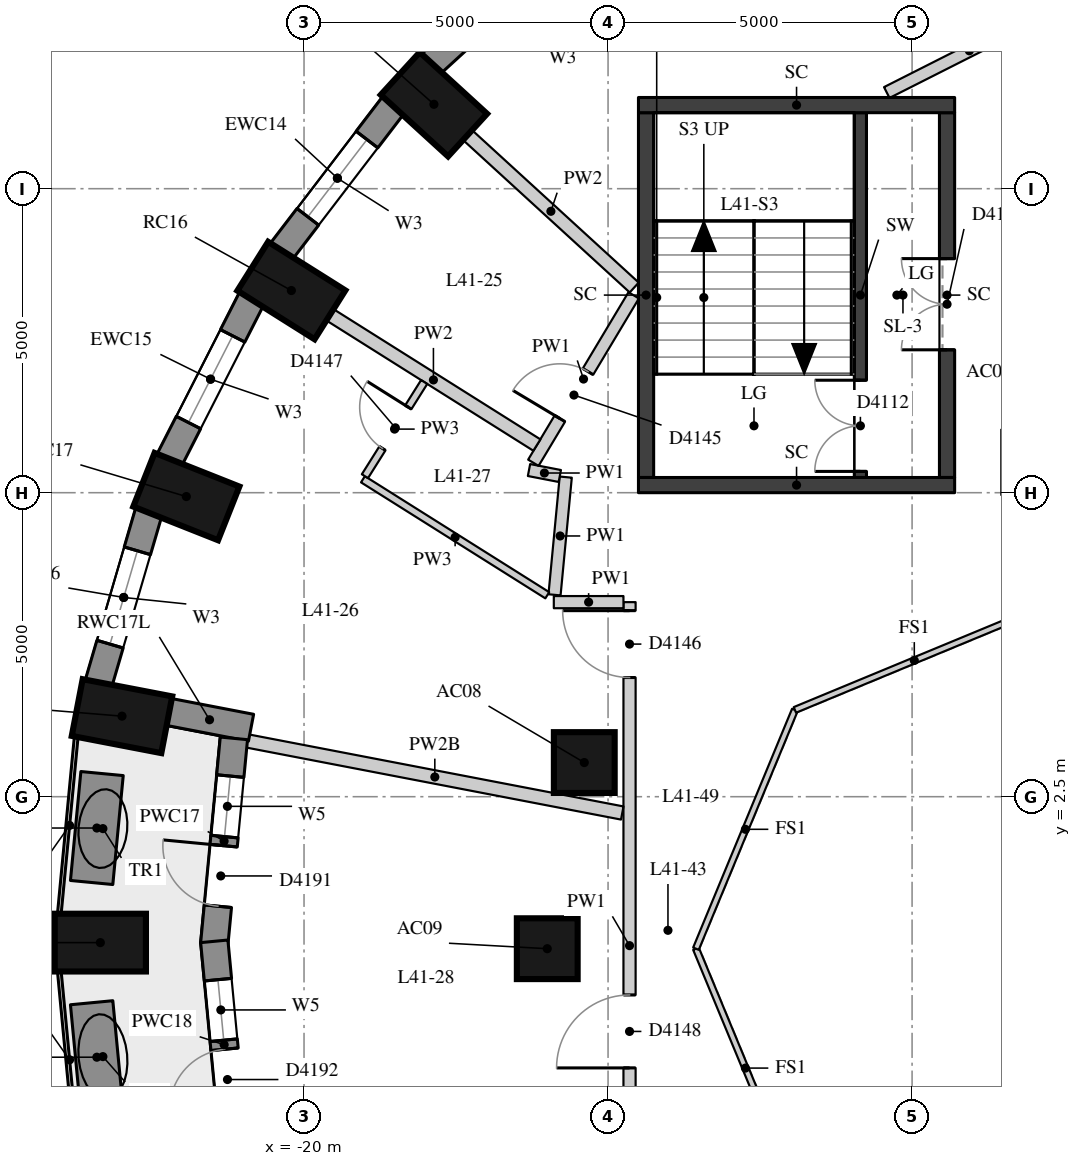
"""IFC4 building model, lengths in metres.
Left out: names, types, materials, properties, quantities, classifications, styles, units other than length and angle.
Written with IfcOpenShell. Run it as: python <this file> out.ifc"""

import sys

from ifc_helpers import new_model, si_unit, direction, frame, frame_2d, origin, origin_2d, place, context, subcontext, project, spatial, rectangle, extrude, element, fill, save


model = new_model("IFC4")
c1 = context("Model", 3, precision=1e-05, world=origin(), true_north=direction((0.0, 1.0)))
c2 = subcontext(c1, "Body", "Model", "MODEL_VIEW")
j1 = project(units=[si_unit("LENGTHUNIT", "METRE"), si_unit("PLANEANGLEUNIT", "RADIAN")], contexts=[c1])
p1 = place(None, origin())
s1 = spatial("IfcSite", under=j1, at=p1, CompositionType="ELEMENT")
p2 = place(p1, origin())
s2 = spatial("IfcBuilding", under=s1, at=p2, CompositionType="ELEMENT")
p3 = place(p2, frame((0.0, 0.0, 148.4)))
s3 = spatial("IfcBuildingStorey", under=s2, at=p3, CompositionType="ELEMENT", Elevation=148.4)
for number, where, z_axis, x_axis in (
    (1, (-17.864, 13.888, 0.0), (0.0, 0.0, 1.0), (-0.738, 0.675, 0.0)),
    (2, (-20.208, 10.825, 0.0), (0.0, 0.0, 1.0), (-0.846, 0.533, 0.0)),
    (3, (-21.936, 7.436, 0.0), (0.0, 0.0, 1.0), (-0.93, 0.369, 0.0)),
    (4, (-22.994, 3.825, 0.0), (0.0, 0.0, 1.0), (-0.982, 0.189, 0.0)),
    (5, (-23.35, 0.1, 0.0), (0.0, 0.0, 1.0), (-1.0, 0.0, 0.0)),
):
    element("IfcColumn", number, at=place(p3, frame(where, z_axis=z_axis, x_axis=x_axis)), inside=s3, PredefinedType="COLUMN", context=c2, shape_type="SweptSolid", body=[
        extrude(rectangle(XDim=1.5, YDim=0.95, at=origin_2d()), origin(), (0.0, 0.0, 1.0), 3.3),
    ])
for number, where, z_axis, x_axis in (
    (6, (-15.391, 3.062, 0.0), (0.0, 0.0, 1.0), (1.0, 0.0, 0.0)),
    (7, (-16.0, 0.0, 0.0), (0.0, 0.0, 1.0), (1.0, 0.0, 0.0)),
):
    element("IfcColumn", number, at=place(p3, frame(where, z_axis=z_axis, x_axis=x_axis)), inside=s3, PredefinedType="COLUMN", context=c2, shape_type="SweptSolid", body=[
        extrude(rectangle(XDim=1.0, YDim=1.0, at=origin_2d()), origin(), (0.0, 0.0, 1.0), 3.3),
    ])
p4 = place(p3, frame((-15.63, 16.639, 0.0), z_axis=(0.0, 0.0, 1.0), x_axis=(-0.737808755941, -0.675009807082, 0.0)))
e8 = element("IfcWall", 8, at=p4, inside=s3, PredefinedType="SOLIDWALL", context=c2, shape_type="SweptSolid", body=[
    extrude(rectangle(XDim=3.094, YDim=0.45, at=frame_2d((1.547, 0.0))), origin(), (0.0, 0.0, 1.0), 3.02),
])
p5 = place(p4, frame((0.747, 0.0, 0.4)))
e9 = element("IfcOpeningElement", 9, at=p5, cuts=e8, PredefinedType="OPENING", context=c2, shape_type="SweptSolid", body=[
    extrude(rectangle(XDim=1.6, YDim=1.75, at=frame_2d((0.8, 0.875))), frame((0.0, 0.235, 0.0), z_axis=(0.0, -1.0, 0.0), x_axis=(1.0, 0.0, 0.0)), (0.0, 0.0, 1.0), 0.47),
])
p6 = place(p3, frame((-18.528, 13.879, 0.0), z_axis=(0.0, 0.0, 1.0), x_axis=(-0.607817056371, -0.794077090706, 0.0)))
e10 = element("IfcWall", 10, at=p6, inside=s3, PredefinedType="SOLIDWALL", context=c2, shape_type="SweptSolid", body=[
    extrude(rectangle(XDim=3.037, YDim=0.45, at=frame_2d((1.519, 0.0))), origin(), (0.0, 0.0, 1.0), 3.02),
])
p7 = place(p6, frame((0.719, 0.0, 0.4)))
e11 = element("IfcOpeningElement", 11, at=p7, cuts=e10, PredefinedType="OPENING", context=c2, shape_type="SweptSolid", body=[
    extrude(rectangle(XDim=1.6, YDim=1.75, at=frame_2d((0.8, 0.875))), frame((0.0, 0.235, 0.0), z_axis=(0.0, -1.0, 0.0), x_axis=(1.0, 0.0, 0.0)), (0.0, 0.0, 1.0), 0.47),
])
p8 = place(p3, frame((-20.859, 10.697, 0.0), z_axis=(0.0, 0.0, 1.0), x_axis=(-0.454133999889, -0.890933392653, 0.0)))
e12 = element("IfcWall", 12, at=p8, inside=s3, PredefinedType="SOLIDWALL", context=c2, shape_type="SweptSolid", body=[
    extrude(rectangle(XDim=2.986, YDim=0.45, at=frame_2d((1.493, 0.0))), origin(), (0.0, 0.0, 1.0), 3.02),
])
p9 = place(p8, frame((0.693, 0.0, 0.4)))
e13 = element("IfcOpeningElement", 13, at=p9, cuts=e12, PredefinedType="OPENING", context=c2, shape_type="SweptSolid", body=[
    extrude(rectangle(XDim=1.6, YDim=1.75, at=frame_2d((0.8, 0.875))), frame((0.0, 0.235, 0.0), z_axis=(0.0, -1.0, 0.0), x_axis=(1.0, 0.0, 0.0)), (0.0, 0.0, 1.0), 0.47),
])
p10 = place(p3, frame((-22.551, 7.191, 0.0), z_axis=(0.0, 0.0, 1.0), x_axis=(-0.281125768296, -0.959670934435, 0.0)))
e14 = element("IfcWall", 14, at=p10, inside=s3, PredefinedType="SOLIDWALL", context=c2, shape_type="SweptSolid", body=[
    extrude(rectangle(XDim=2.948, YDim=0.45, at=frame_2d((1.474, 0.0))), origin(), (0.0, 0.0, 1.0), 3.02),
])
p11 = place(p10, frame((0.674, 0.0, 0.4)))
e15 = element("IfcOpeningElement", 15, at=p11, cuts=e14, PredefinedType="OPENING", context=c2, shape_type="SweptSolid", body=[
    extrude(rectangle(XDim=1.6, YDim=1.75, at=frame_2d((0.8, 0.875))), frame((0.0, 0.235, 0.0), z_axis=(0.0, -1.0, 0.0), x_axis=(1.0, 0.0, 0.0)), (0.0, 0.0, 1.0), 0.47),
])
p12 = place(p3, frame((-22.237, 3.896, 0.0), z_axis=(0.0, 0.0, 1.0), x_axis=(0.98204526411, -0.188645432598, 0.0)))
e16 = element("IfcWall", 16, at=p12, inside=s3, PredefinedType="SOLIDWALL", context=c2, shape_type="SweptSolid", body=[
    extrude(rectangle(XDim=1.39, YDim=0.45, at=frame_2d((0.695, 0.0))), origin(), (0.0, 0.0, 1.0), 2.57),
])
p13 = place(p3, frame((-21.154, 3.459, 0.0), z_axis=(0.0, 0.0, 1.0), x_axis=(-0.094968544931, -0.995480273774, 0.0)))
e17 = element("IfcWall", 17, at=p13, inside=s3, PredefinedType="SOLIDWALL", context=c2, shape_type="SweptSolid", body=[
    extrude(rectangle(XDim=3.396, YDim=0.45, at=frame_2d((1.698, 0.0))), origin(), (0.0, 0.0, 1.0), 3.02),
])
p14 = place(p13, frame((0.623, 0.0, 0.4)))
e18 = element("IfcOpeningElement", 18, at=p14, cuts=e17, PredefinedType="OPENING", context=c2, shape_type="SweptSolid", body=[
    extrude(rectangle(XDim=1.0, YDim=1.75, at=frame_2d((0.5, 0.875))), frame((0.0, 0.235, 0.0), z_axis=(0.0, -1.0, 0.0), x_axis=(1.0, 0.0, 0.0)), (0.0, 0.0, 1.0), 0.47),
])
p15 = place(p13, frame((1.773, 0.0, 0.0)))
e19 = element("IfcOpeningElement", 19, at=p15, cuts=e17, PredefinedType="OPENING", context=c2, shape_type="SweptSolid", body=[
    extrude(rectangle(XDim=1.0, YDim=2.15, at=frame_2d((0.5, 1.075))), frame((0.0, 0.235, 0.0), z_axis=(0.0, -1.0, 0.0), x_axis=(1.0, 0.0, 0.0)), (0.0, 0.0, 1.0), 0.47),
])
p16 = place(p3, frame((-21.476, 0.121, 0.0), z_axis=(0.0, 0.0, 1.0), x_axis=(0.094947321258, -0.995482298279, 0.0)))
e20 = element("IfcWall", 20, at=p16, inside=s3, PredefinedType="SOLIDWALL", context=c2, shape_type="SweptSolid", body=[
    extrude(rectangle(XDim=3.417, YDim=0.45, at=frame_2d((1.708, 0.0))), origin(), (0.0, 0.0, 1.0), 3.02),
])
p17 = place(p16, frame((0.634, 0.0, 0.4)))
e21 = element("IfcOpeningElement", 21, at=p17, cuts=e20, PredefinedType="OPENING", context=c2, shape_type="SweptSolid", body=[
    extrude(rectangle(XDim=1.0, YDim=1.75, at=frame_2d((0.5, 0.875))), frame((0.0, 0.235, 0.0), z_axis=(0.0, -1.0, 0.0), x_axis=(1.0, 0.0, 0.0)), (0.0, 0.0, 1.0), 0.47),
])
p18 = place(p16, frame((1.784, 0.0, 0.0)))
e22 = element("IfcOpeningElement", 22, at=p18, cuts=e20, PredefinedType="OPENING", context=c2, shape_type="SweptSolid", body=[
    extrude(rectangle(XDim=1.0, YDim=2.15, at=frame_2d((0.5, 1.075))), frame((0.0, 0.235, 0.0), z_axis=(0.0, -1.0, 0.0), x_axis=(1.0, 0.0, 0.0)), (0.0, 0.0, 1.0), 0.47),
])
for number, where, z_axis, x_axis in (
    (23, (-23.322, 2.881, 0.0), (0.0, 0.0, 1.0), (-0.095, -0.995, 0.0)),
    (24, (-23.493, -0.889, 0.0), (0.0, 0.0, 1.0), (0.095, -0.995, 0.0)),
):
    element("IfcWall", number, at=place(p3, frame(where, z_axis=z_axis, x_axis=x_axis)), inside=s3, PredefinedType="USERDEFINED", context=c2, shape_type="SweptSolid", body=[
        extrude(rectangle(XDim=1.8, YDim=0.7, at=frame_2d((0.9, 0.0))), origin(), (0.0, 0.0, 1.0), 0.75),
    ])
p19 = place(p3, frame((-10.85, 7.75, 0.0), z_axis=(0.0, 0.0, 1.0), x_axis=(0.0, 1.0, 0.0)))
e25 = element("IfcWall", 25, at=p19, inside=s3, PredefinedType="SHEAR", context=c2, shape_type="SweptSolid", body=[
    extrude(rectangle(XDim=6.0, YDim=0.2, at=frame_2d((3.0, 0.0))), origin(), (0.0, 0.0, 1.0), 3.02),
])
p20 = place(p19, frame((0.1, 0.0, 0.0)))
e26 = element("IfcOpeningElement", 26, at=p20, cuts=e25, PredefinedType="OPENING", context=c2, shape_type="SweptSolid", body=[
    extrude(rectangle(XDim=1.5, YDim=2.1, at=frame_2d((0.75, 1.05))), frame((0.0, 0.11, 0.0), z_axis=(0.0, -1.0, 0.0), x_axis=(1.0, 0.0, 0.0)), (0.0, 0.0, 1.0), 0.22),
])
p21 = place(p3, frame((-14.375, 7.75, -0.28), z_axis=(0.0, 0.0, 1.0), x_axis=(0.0, 1.0, 0.0)))
e27 = element("IfcWall", 27, at=p21, inside=s3, PredefinedType="SHEAR", context=c2, shape_type="SweptSolid", body=[
    extrude(rectangle(XDim=6.0, YDim=0.25, at=frame_2d((3.0, 0.0))), origin(), (0.0, 0.0, 1.0), 3.3),
])
p22 = place(p3, frame((-9.425, 7.75, -0.28), z_axis=(0.0, 0.0, 1.0), x_axis=(0.0, 1.0, 0.0)))
e28 = element("IfcWall", 28, at=p22, inside=s3, PredefinedType="SHEAR", context=c2, shape_type="SweptSolid", body=[
    extrude(rectangle(XDim=6.0, YDim=0.25, at=frame_2d((3.0, 0.0))), origin(), (0.0, 0.0, 1.0), 3.3),
])
p23 = place(p22, frame((2.1, 0.0, 0.28)))
e29 = element("IfcOpeningElement", 29, at=p23, cuts=e28, PredefinedType="OPENING", context=c2, shape_type="SweptSolid", body=[
    extrude(rectangle(XDim=1.5, YDim=2.1, at=frame_2d((0.75, 1.05))), frame((0.0, 0.135, 0.0), z_axis=(0.0, -1.0, 0.0), x_axis=(1.0, 0.0, 0.0)), (0.0, 0.0, 1.0), 0.27),
])
for number, where, z_axis, x_axis in (
    (30, (-14.5, 13.875, -0.28), (0.0, 0.0, 1.0), (1.0, 0.0, 0.0)),
    (31, (-14.5, 7.625, -0.28), (0.0, 0.0, 1.0), (1.0, 0.0, 0.0)),
):
    element("IfcWall", number, at=place(p3, frame(where, z_axis=z_axis, x_axis=x_axis)), inside=s3, PredefinedType="SHEAR", context=c2, shape_type="SweptSolid", body=[
        extrude(rectangle(XDim=5.2, YDim=0.25, at=frame_2d((2.6, 0.0))), origin(), (0.0, 0.0, 1.0), 3.3),
    ])
p24 = place(p3, frame((-14.647, -5.6, 0.0), z_axis=(0.0, 0.0, 1.0), x_axis=(0.0, 1.0, 0.0)))
e32 = element("IfcWall", 32, at=p24, inside=s3, PredefinedType="PARTITIONING", context=c2, shape_type="SweptSolid", body=[
    extrude(rectangle(XDim=11.3, YDim=0.2, at=frame_2d((5.65, 0.0))), origin(), (0.0, 0.0, 1.0), 3.02),
])
p25 = place(p24, frame((10.06, 0.0, 0.0)))
e33 = element("IfcOpeningElement", 33, at=p25, cuts=e32, PredefinedType="OPENING", context=c2, shape_type="SweptSolid", body=[
    extrude(rectangle(XDim=1.1, YDim=2.1, at=frame_2d((0.55, 1.05))), frame((0.0, 0.11, 0.0), z_axis=(0.0, -1.0, 0.0), x_axis=(1.0, 0.0, 0.0)), (0.0, 0.0, 1.0), 0.22),
])
p26 = place(p24, frame((3.639, 0.0, 0.0)))
e34 = element("IfcOpeningElement", 34, at=p26, cuts=e32, PredefinedType="OPENING", context=c2, shape_type="SweptSolid", body=[
    extrude(rectangle(XDim=1.2, YDim=2.1, at=frame_2d((0.6, 1.05))), frame((0.0, 0.11, 0.0), z_axis=(0.0, -1.0, 0.0), x_axis=(1.0, 0.0, 0.0)), (0.0, 0.0, 1.0), 0.22),
])
p27 = place(p24, frame((0.14, 0.0, 0.0)))
e35 = element("IfcOpeningElement", 35, at=p27, cuts=e32, PredefinedType="OPENING", context=c2, shape_type="SweptSolid", body=[
    extrude(rectangle(XDim=0.9, YDim=2.1, at=frame_2d((0.45, 1.05))), frame((0.0, 0.11, 0.0), z_axis=(0.0, -1.0, 0.0), x_axis=(1.0, 0.0, 0.0)), (0.0, 0.0, 1.0), 0.22),
])
p28 = place(p3, frame((-14.747, 5.7, 0.0), z_axis=(0.0, 0.0, 1.0), x_axis=(-1.0, 0.0, 0.0)))
e36 = element("IfcWall", 36, at=p28, inside=s3, PredefinedType="PARTITIONING", context=c2, shape_type="SweptSolid", body=[
    extrude(rectangle(XDim=1.145, YDim=0.2, at=frame_2d((0.573, 0.0))), origin(), (0.0, 0.0, 1.0), 3.02),
])
p29 = place(p3, frame((-15.88, 5.82, 0.0), z_axis=(0.0, 0.0, 1.0), x_axis=(0.094892019157, 0.995487571344, 0.0)))
e37 = element("IfcWall", 37, at=p29, inside=s3, PredefinedType="PARTITIONING", context=c2, shape_type="SweptSolid", body=[
    extrude(rectangle(XDim=1.945, YDim=0.2, at=frame_2d((0.973, 0.0))), origin(), (0.0, 0.0, 1.0), 3.02),
])
p30 = place(p3, frame((-15.793, 7.775, 0.0), z_axis=(0.0, 0.0, 1.0), x_axis=(-0.981833914825, 0.189742361371, 0.0)))
e38 = element("IfcWall", 38, at=p30, inside=s3, PredefinedType="PARTITIONING", context=c2, shape_type="SweptSolid", body=[
    extrude(rectangle(XDim=0.516, YDim=0.2, at=frame_2d((0.258, 0.0))), origin(), (0.0, 0.0, 1.0), 3.02),
])
p31 = place(p3, frame((-16.228, 7.992, 0.0), z_axis=(0.0, 0.0, 1.0), x_axis=(0.513936465122, 0.857828251935, 0.0)))
e39 = element("IfcWall", 39, at=p31, inside=s3, PredefinedType="PARTITIONING", context=c2, shape_type="SweptSolid", body=[
    extrude(rectangle(XDim=3.21, YDim=0.2, at=frame_2d((1.605, 0.0))), origin(), (0.0, 0.0, 1.0), 3.02),
])
p32 = place(p31, frame((0.848, 0.0, 0.0)))
e40 = element("IfcOpeningElement", 40, at=p32, cuts=e39, PredefinedType="OPENING", context=c2, shape_type="SweptSolid", body=[
    extrude(rectangle(XDim=0.9, YDim=2.1, at=frame_2d((0.45, 1.05))), frame((0.0, 0.11, 0.0), z_axis=(0.0, -1.0, 0.0), x_axis=(1.0, 0.0, 0.0)), (0.0, 0.0, 1.0), 0.22),
])
p33 = place(p3, frame((-10.416, 14.082, 0.0), z_axis=(0.0, 0.0, 1.0), x_axis=(0.892396808139, 0.451251522793, 0.0)))
e41 = element("IfcWall", 41, at=p33, inside=s3, PredefinedType="PARTITIONING", context=c2, shape_type="SweptSolid", body=[
    extrude(rectangle(XDim=3.044, YDim=0.2, at=frame_2d((1.522, 0.0))), origin(), (0.0, 0.0, 1.0), 3.02),
])
p34 = place(p3, frame((-17.31, 13.382, 0.0), z_axis=(0.0, 0.0, 1.0), x_axis=(0.737860436015, -0.674953314655, 0.0)))
e42 = element("IfcWall", 42, at=p34, inside=s3, PredefinedType="PARTITIONING", context=c2, shape_type="SweptSolid", body=[
    extrude(rectangle(XDim=3.714, YDim=0.22, at=frame_2d((1.857, 0.0))), origin(), (0.0, 0.0, 1.0), 3.02),
])
p35 = place(p3, frame((-19.573, 10.426, 0.0), z_axis=(0.0, 0.0, 1.0), x_axis=(0.846298736827, -0.532708595805, 0.0)))
e43 = element("IfcWall", 43, at=p35, inside=s3, PredefinedType="PARTITIONING", context=c2, shape_type="SweptSolid", body=[
    extrude(rectangle(XDim=4.021, YDim=0.22, at=frame_2d((2.011, 0.0))), origin(), (0.0, 0.0, 1.0), 3.02),
])
p36 = place(p3, frame((-20.932, 3.417, 0.0), z_axis=(0.0, 0.0, 1.0), x_axis=(0.982023362662, -0.188759410856, 0.0)))
e44 = element("IfcWall", 44, at=p36, inside=s3, PredefinedType="PARTITIONING", context=c2, shape_type="SweptSolid", body=[
    extrude(rectangle(XDim=6.278, YDim=0.22, at=frame_2d((3.139, 0.0))), origin(), (0.0, 0.0, 1.0), 2.57),
])
p37 = place(p3, frame((-16.0, 5.813, 0.0), z_axis=(0.0, 0.0, 1.0), x_axis=(-0.846339825068, 0.53264331452, 0.0)))
e45 = element("IfcWall", 45, at=p37, inside=s3, PredefinedType="PARTITIONING", context=c2, shape_type="SweptSolid", body=[
    extrude(rectangle(XDim=3.582, YDim=0.12, at=frame_2d((1.791, 0.0))), origin(), (0.0, 0.0, 1.0), 3.02),
])
p38 = place(p3, frame((-18.999, 7.771, 0.0), z_axis=(0.0, 0.0, 1.0), x_axis=(0.532431076319, 0.84647335987, 0.0)))
e46 = element("IfcWall", 46, at=p38, inside=s3, PredefinedType="PARTITIONING", context=c2, shape_type="SweptSolid", body=[
    extrude(rectangle(XDim=1.83, YDim=0.12, at=frame_2d((0.915, 0.0))), origin(), (0.0, 0.0, 1.0), 3.02),
])
p39 = place(p38, frame((0.54, 0.0, 0.0)))
e47 = element("IfcOpeningElement", 47, at=p39, cuts=e46, PredefinedType="OPENING", context=c2, shape_type="SweptSolid", body=[
    extrude(rectangle(XDim=0.8, YDim=2.1, at=frame_2d((0.4, 1.05))), frame((0.0, 0.07, 0.0), z_axis=(0.0, -1.0, 0.0), x_axis=(1.0, 0.0, 0.0)), (0.0, 0.0, 1.0), 0.14),
])
for number, where, z_axis, x_axis in (
    (48, (-11.927, -3.927, 0.0), (0.0, 0.0, 1.0), (-0.383, 0.924, 0.0)),
    (49, (-13.554, 0.0, 0.0), (0.0, 0.0, 1.0), (0.383, 0.924, 0.0)),
    (50, (-11.927, 3.927, 0.0), (0.0, 0.0, 1.0), (0.924, 0.383, 0.0)),
):
    element("IfcWall", number, at=place(p3, frame(where, z_axis=z_axis, x_axis=x_axis)), inside=s3, PredefinedType="PARTITIONING", context=c2, shape_type="SweptSolid", body=[
        extrude(rectangle(XDim=4.251, YDim=0.1, at=frame_2d((2.125, 0.0))), origin(), (0.0, 0.0, 1.0), 3.02),
    ])
p40 = place(p7, origin())
e51 = element("IfcWindow", 51, at=p40, inside=s3, PartitioningType="SINGLE_PANEL", PredefinedType="WINDOW", context=c2, shape_type="SweptSolid", body=[
    extrude(rectangle(XDim=1.6, YDim=1.75, at=frame_2d((0.8, 0.875))), frame((0.0, 0.035, 0.0), z_axis=(0.0, -1.0, 0.0), x_axis=(1.0, 0.0, 0.0)), (0.0, 0.0, 1.0), 0.06),
])
fill(e11, e51)
p41 = place(p9, origin())
e52 = element("IfcWindow", 52, at=p41, inside=s3, PartitioningType="SINGLE_PANEL", PredefinedType="WINDOW", context=c2, shape_type="SweptSolid", body=[
    extrude(rectangle(XDim=1.6, YDim=1.75, at=frame_2d((0.8, 0.875))), frame((0.0, 0.035, 0.0), z_axis=(0.0, -1.0, 0.0), x_axis=(1.0, 0.0, 0.0)), (0.0, 0.0, 1.0), 0.06),
])
fill(e13, e52)
p42 = place(p11, origin())
e53 = element("IfcWindow", 53, at=p42, inside=s3, PartitioningType="SINGLE_PANEL", PredefinedType="WINDOW", context=c2, shape_type="SweptSolid", body=[
    extrude(rectangle(XDim=1.6, YDim=1.75, at=frame_2d((0.8, 0.875))), frame((0.0, 0.035, 0.0), z_axis=(0.0, -1.0, 0.0), x_axis=(1.0, 0.0, 0.0)), (0.0, 0.0, 1.0), 0.06),
])
fill(e15, e53)
p43 = place(p14, origin())
e54 = element("IfcWindow", 54, at=p43, inside=s3, PartitioningType="SINGLE_PANEL", PredefinedType="WINDOW", context=c2, shape_type="SweptSolid", body=[
    extrude(rectangle(XDim=1.0, YDim=1.75, at=frame_2d((0.5, 0.875))), frame((0.0, 0.035, 0.0), z_axis=(0.0, -1.0, 0.0), x_axis=(1.0, 0.0, 0.0)), (0.0, 0.0, 1.0), 0.06),
])
fill(e18, e54)
p44 = place(p15, frame((1.0, 0.0, 0.0), z_axis=(0.0, 0.0, 1.0), x_axis=(-1.0, 0.0, 0.0)))
e55 = element("IfcDoor", 55, at=p44, inside=s3, OperationType="SINGLE_SWING_RIGHT", PredefinedType="DOOR", context=c2, shape_type="SweptSolid", body=[
    extrude(rectangle(XDim=1.0, YDim=2.15, at=frame_2d((0.5, 1.075))), frame((0.0, 0.075, 0.0), z_axis=(0.0, -1.0, 0.0), x_axis=(1.0, 0.0, 0.0)), (0.0, 0.0, 1.0), 0.05),
])
fill(e19, e55)
p45 = place(p17, origin())
e56 = element("IfcWindow", 56, at=p45, inside=s3, PartitioningType="SINGLE_PANEL", PredefinedType="WINDOW", context=c2, shape_type="SweptSolid", body=[
    extrude(rectangle(XDim=1.0, YDim=1.75, at=frame_2d((0.5, 0.875))), frame((0.0, 0.035, 0.0), z_axis=(0.0, -1.0, 0.0), x_axis=(1.0, 0.0, 0.0)), (0.0, 0.0, 1.0), 0.06),
])
fill(e21, e56)
p46 = place(p18, frame((1.0, 0.0, 0.0), z_axis=(0.0, 0.0, 1.0), x_axis=(-1.0, 0.0, 0.0)))
e57 = element("IfcDoor", 57, at=p46, inside=s3, OperationType="SINGLE_SWING_LEFT", PredefinedType="DOOR", context=c2, shape_type="SweptSolid", body=[
    extrude(rectangle(XDim=1.0, YDim=2.15, at=frame_2d((0.5, 1.075))), frame((0.0, 0.075, 0.0), z_axis=(0.0, -1.0, 0.0), x_axis=(1.0, 0.0, 0.0)), (0.0, 0.0, 1.0), 0.05),
])
fill(e22, e57)
p47 = place(p20, origin())
e58 = element("IfcDoor", 58, at=p47, inside=s3, OperationType="DOUBLE_DOOR_SINGLE_SWING", PredefinedType="DOOR", context=c2, shape_type="SweptSolid", body=[
    extrude(rectangle(XDim=1.5, YDim=2.1, at=frame_2d((0.75, 1.05))), frame((0.0, 0.025, 0.0), z_axis=(0.0, -1.0, 0.0), x_axis=(1.0, 0.0, 0.0)), (0.0, 0.0, 1.0), 0.05),
])
fill(e26, e58)
p48 = place(p23, origin())
e59 = element("IfcDoor", 59, at=p48, inside=s3, OperationType="DOUBLE_DOOR_SINGLE_SWING", PredefinedType="DOOR", context=c2, shape_type="SweptSolid", body=[
    extrude(rectangle(XDim=1.5, YDim=2.1, at=frame_2d((0.75, 1.05))), frame((0.0, 0.025, 0.0), z_axis=(0.0, -1.0, 0.0), x_axis=(1.0, 0.0, 0.0)), (0.0, 0.0, 1.0), 0.05),
])
fill(e29, e59)
p49 = place(p32, origin())
e60 = element("IfcDoor", 60, at=p49, inside=s3, OperationType="SINGLE_SWING_LEFT", PredefinedType="DOOR", context=c2, shape_type="SweptSolid", body=[
    extrude(rectangle(XDim=0.9, YDim=2.1, at=frame_2d((0.45, 1.05))), frame((0.0, 0.025, 0.0), z_axis=(0.0, -1.0, 0.0), x_axis=(1.0, 0.0, 0.0)), (0.0, 0.0, 1.0), 0.05),
])
fill(e40, e60)
p50 = place(p25, origin())
e61 = element("IfcDoor", 61, at=p50, inside=s3, OperationType="SINGLE_SWING_RIGHT", PredefinedType="DOOR", context=c2, shape_type="SweptSolid", body=[
    extrude(rectangle(XDim=1.1, YDim=2.1, at=frame_2d((0.55, 1.05))), frame((0.0, 0.025, 0.0), z_axis=(0.0, -1.0, 0.0), x_axis=(1.0, 0.0, 0.0)), (0.0, 0.0, 1.0), 0.05),
])
fill(e33, e61)
p51 = place(p39, origin())
e62 = element("IfcDoor", 62, at=p51, inside=s3, OperationType="SINGLE_SWING_RIGHT", PredefinedType="DOOR", context=c2, shape_type="SweptSolid", body=[
    extrude(rectangle(XDim=0.8, YDim=2.1, at=frame_2d((0.4, 1.05))), frame((0.0, 0.025, 0.0), z_axis=(0.0, -1.0, 0.0), x_axis=(1.0, 0.0, 0.0)), (0.0, 0.0, 1.0), 0.05),
])
fill(e47, e62)
p52 = place(p26, origin())
e63 = element("IfcDoor", 63, at=p52, inside=s3, OperationType="SINGLE_SWING_LEFT", PredefinedType="DOOR", context=c2, shape_type="SweptSolid", body=[
    extrude(rectangle(XDim=1.2, YDim=2.1, at=frame_2d((0.6, 1.05))), frame((0.0, 0.025, 0.0), z_axis=(0.0, -1.0, 0.0), x_axis=(1.0, 0.0, 0.0)), (0.0, 0.0, 1.0), 0.05),
])
fill(e34, e63)
save(model, sys.argv[1])
